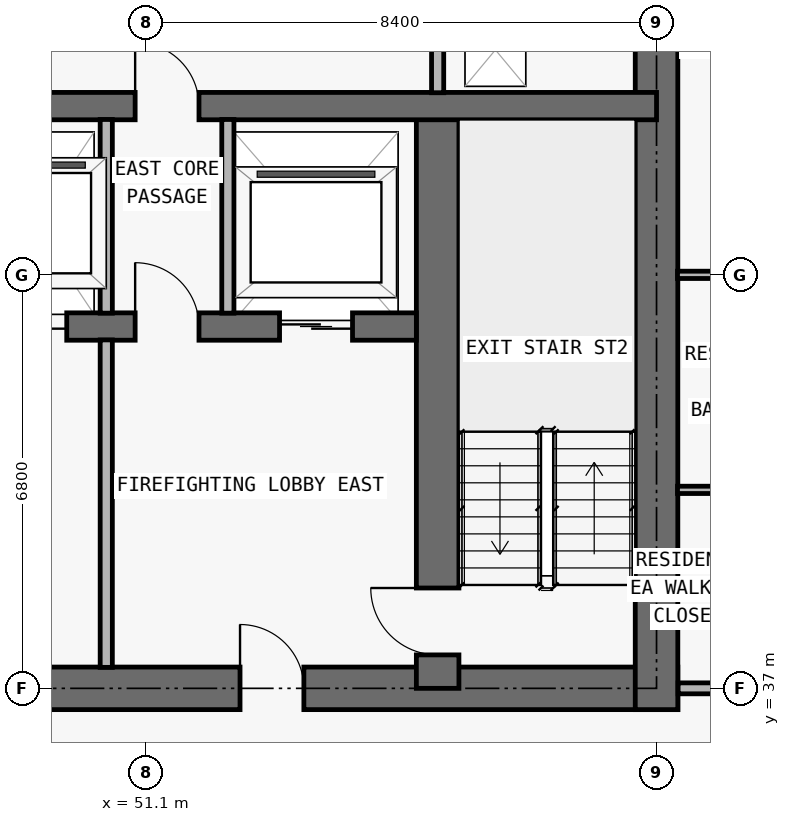
"""IFC4 building model, lengths in metres.
Left out: names, types, materials, properties, quantities, classifications, styles, units other than length and angle.
Written with IfcOpenShell. Run it as: python <this file> out.ifc"""

import sys

from ifc_helpers import new_model, si_unit, direction, frame, frame_2d, origin, place, context, subcontext, project, spatial, rectangle, extrude, element, fill, save


model = new_model("IFC4")
c1 = context("Model", 3, precision=1e-05, world=origin(), true_north=direction((0.0, 1.0)))
c2 = subcontext(c1, "Body", "Model", "MODEL_VIEW")
j1 = project(units=[si_unit("LENGTHUNIT", "METRE"), si_unit("PLANEANGLEUNIT", "RADIAN")], contexts=[c1])
p1 = place(None, origin())
s1 = spatial("IfcSite", under=j1, at=p1, CompositionType="ELEMENT")
p2 = place(p1, origin())
s2 = spatial("IfcBuilding", under=s1, at=p2, CompositionType="ELEMENT")
p3 = place(p2, frame((0.0, 0.0, 249.6)))
s3 = spatial("IfcBuildingStorey", under=s2, at=p3, CompositionType="ELEMENT", Elevation=249.6)
p4 = place(p3, frame((17.95, 37.0, 0.0), z_axis=(0.0, 0.0, 1.0), x_axis=(1.0, 0.0, 0.0)))
e1 = element("IfcWall", 1, at=p4, inside=s3, PredefinedType="SHEAR", context=c2, shape_type="SweptSolid", body=[
    extrude(rectangle(XDim=41.9, YDim=0.7, at=frame_2d((20.95, 0.0))), origin(), (0.0, 0.0, 1.0), 3.05),
])
p5 = place(p4, frame((14.35, 0.0, 0.0)))
e2 = element("IfcOpeningElement", 2, at=p5, cuts=e1, PredefinedType="OPENING", context=c2, shape_type="SweptSolid", body=[
    extrude(rectangle(XDim=1.1, YDim=2.15, at=frame_2d((0.55, 1.075))), frame((0.0, 0.36, 0.0), z_axis=(0.0, -1.0, 0.0), x_axis=(1.0, 0.0, 0.0)), (0.0, 0.0, 1.0), 0.72),
])
p6 = place(p4, frame((6.2, 0.0, 0.0)))
e3 = element("IfcOpeningElement", 3, at=p6, cuts=e1, PredefinedType="OPENING", context=c2, shape_type="SweptSolid", body=[
    extrude(rectangle(XDim=1.05, YDim=2.15, at=frame_2d((0.525, 1.075))), frame((0.0, 0.36, 0.0), z_axis=(0.0, -1.0, 0.0), x_axis=(1.0, 0.0, 0.0)), (0.0, 0.0, 1.0), 0.72),
])
p7 = place(p4, frame((34.7, 0.0, 0.0)))
e4 = element("IfcOpeningElement", 4, at=p7, cuts=e1, PredefinedType="OPENING", context=c2, shape_type="SweptSolid", body=[
    extrude(rectangle(XDim=1.05, YDim=2.15, at=frame_2d((0.525, 1.075))), frame((0.0, 0.36, 0.0), z_axis=(0.0, -1.0, 0.0), x_axis=(1.0, 0.0, 0.0)), (0.0, 0.0, 1.0), 0.72),
])
p8 = place(p4, frame((10.812, 0.0, 0.0)))
e5 = element("IfcOpeningElement", 5, at=p8, cuts=e1, PredefinedType="OPENING", context=c2, shape_type="SweptSolid", body=[
    extrude(rectangle(XDim=1.05, YDim=2.15, at=frame_2d((0.525, 1.075))), frame((0.0, 0.36, 0.0), z_axis=(0.0, -1.0, 0.0), x_axis=(1.0, 0.0, 0.0)), (0.0, 0.0, 1.0), 0.72),
])
p9 = place(p4, frame((24.05, 0.0, 0.0)))
e6 = element("IfcOpeningElement", 6, at=p9, cuts=e1, PredefinedType="OPENING", context=c2, shape_type="SweptSolid", body=[
    extrude(rectangle(XDim=1.05, YDim=2.15, at=frame_2d((0.525, 1.075))), frame((0.0, 0.36, 0.0), z_axis=(0.0, -1.0, 0.0), x_axis=(1.0, 0.0, 0.0)), (0.0, 0.0, 1.0), 0.72),
])
p10 = place(p3, frame((59.5, 36.65, 0.0), z_axis=(0.0, 0.0, 1.0), x_axis=(0.0, 1.0, 0.0)))
e7 = element("IfcWall", 7, at=p10, inside=s3, PredefinedType="SHEAR", context=c2, shape_type="SweptSolid", body=[
    extrude(rectangle(XDim=13.95, YDim=0.7, at=frame_2d((6.975, 0.0))), origin(), (0.0, 0.0, 1.0), 3.05),
])
p11 = place(p3, frame((55.9, 37.0, 0.0), z_axis=(0.0, 0.0, 1.0), x_axis=(0.0, 1.0, 0.0)))
e8 = element("IfcWall", 8, at=p11, inside=s3, PredefinedType="SHEAR", context=c2, shape_type="SweptSolid", body=[
    extrude(rectangle(XDim=9.575, YDim=0.7, at=frame_2d((4.788, 0.0))), origin(), (0.0, 0.0, 1.0), 3.05),
])
p12 = place(p11, frame((0.55, 0.0, 0.0)))
e9 = element("IfcOpeningElement", 9, at=p12, cuts=e8, PredefinedType="OPENING", context=c2, shape_type="SweptSolid", body=[
    extrude(rectangle(XDim=1.1, YDim=2.15, at=frame_2d((0.55, 1.075))), frame((0.0, 0.36, 0.0), z_axis=(0.0, -1.0, 0.0), x_axis=(1.0, 0.0, 0.0)), (0.0, 0.0, 1.0), 0.72),
])
p13 = place(p3, frame((22.25, 42.95, 0.0), z_axis=(0.0, 0.0, 1.0), x_axis=(1.0, 0.0, 0.0)))
e10 = element("IfcWall", 10, at=p13, inside=s3, PredefinedType="SHEAR", context=c2, shape_type="SweptSolid", body=[
    extrude(rectangle(XDim=33.3, YDim=0.45, at=frame_2d((16.65, 0.0))), origin(), (0.0, 0.0, 1.0), 3.05),
])
p14 = place(p13, frame((1.05, 0.0, 0.0)))
e11 = element("IfcOpeningElement", 11, at=p14, cuts=e10, PredefinedType="OPENING", context=c2, shape_type="SweptSolid", body=[
    extrude(rectangle(XDim=1.2, YDim=2.2, at=frame_2d((0.6, 1.1))), frame((0.0, 0.235, 0.0), z_axis=(0.0, -1.0, 0.0), x_axis=(1.0, 0.0, 0.0)), (0.0, 0.0, 1.0), 0.47),
])
p15 = place(p13, frame((31.05, 0.0, 0.0)))
e12 = element("IfcOpeningElement", 12, at=p15, cuts=e10, PredefinedType="OPENING", context=c2, shape_type="SweptSolid", body=[
    extrude(rectangle(XDim=1.2, YDim=2.2, at=frame_2d((0.6, 1.1))), frame((0.0, 0.235, 0.0), z_axis=(0.0, -1.0, 0.0), x_axis=(1.0, 0.0, 0.0)), (0.0, 0.0, 1.0), 0.47),
])
p16 = place(p13, frame((26.45, 0.0, 0.0)))
e13 = element("IfcOpeningElement", 13, at=p16, cuts=e10, PredefinedType="OPENING", context=c2, shape_type="SweptSolid", body=[
    extrude(rectangle(XDim=1.1, YDim=2.2, at=frame_2d((0.55, 1.1))), frame((0.0, 0.235, 0.0), z_axis=(0.0, -1.0, 0.0), x_axis=(1.0, 0.0, 0.0)), (0.0, 0.0, 1.0), 0.47),
])
p17 = place(p13, frame((5.95, 0.0, 0.0)))
e14 = element("IfcOpeningElement", 14, at=p17, cuts=e10, PredefinedType="OPENING", context=c2, shape_type="SweptSolid", body=[
    extrude(rectangle(XDim=1.1, YDim=2.2, at=frame_2d((0.55, 1.1))), frame((0.0, 0.235, 0.0), z_axis=(0.0, -1.0, 0.0), x_axis=(1.0, 0.0, 0.0)), (0.0, 0.0, 1.0), 0.47),
])
p18 = place(p13, frame((3.625, 0.0, 0.0)))
e15 = element("IfcOpeningElement", 15, at=p18, cuts=e10, PredefinedType="OPENING", context=c2, shape_type="SweptSolid", body=[
    extrude(rectangle(XDim=1.05, YDim=2.15, at=frame_2d((0.525, 1.075))), frame((0.0, 0.235, 0.0), z_axis=(0.0, -1.0, 0.0), x_axis=(1.0, 0.0, 0.0)), (0.0, 0.0, 1.0), 0.47),
])
p19 = place(p13, frame((28.675, 0.0, 0.0)))
e16 = element("IfcOpeningElement", 16, at=p19, cuts=e10, PredefinedType="OPENING", context=c2, shape_type="SweptSolid", body=[
    extrude(rectangle(XDim=1.05, YDim=2.15, at=frame_2d((0.525, 1.075))), frame((0.0, 0.235, 0.0), z_axis=(0.0, -1.0, 0.0), x_axis=(1.0, 0.0, 0.0)), (0.0, 0.0, 1.0), 0.47),
])
p20 = place(p13, frame((15.225, 0.0, 0.0)))
e17 = element("IfcOpeningElement", 17, at=p20, cuts=e10, PredefinedType="OPENING", context=c2, shape_type="SweptSolid", body=[
    extrude(rectangle(XDim=1.0, YDim=2.2, at=frame_2d((0.5, 1.1))), frame((0.0, 0.235, 0.0), z_axis=(0.0, -1.0, 0.0), x_axis=(1.0, 0.0, 0.0)), (0.0, 0.0, 1.0), 0.47),
])
p21 = place(p13, frame((21.975, 0.0, 0.0)))
e18 = element("IfcOpeningElement", 18, at=p21, cuts=e10, PredefinedType="OPENING", context=c2, shape_type="SweptSolid", body=[
    extrude(rectangle(XDim=1.0, YDim=2.2, at=frame_2d((0.5, 1.1))), frame((0.0, 0.235, 0.0), z_axis=(0.0, -1.0, 0.0), x_axis=(1.0, 0.0, 0.0)), (0.0, 0.0, 1.0), 0.47),
])
p22 = place(p3, frame((18.3, 46.575, 0.0), z_axis=(0.0, 0.0, 1.0), x_axis=(1.0, 0.0, 0.0)))
e19 = element("IfcWall", 19, at=p22, inside=s3, PredefinedType="SHEAR", context=c2, shape_type="SweptSolid", body=[
    extrude(rectangle(XDim=41.2, YDim=0.45, at=frame_2d((20.6, 0.0))), origin(), (0.0, 0.0, 1.0), 3.05),
])
p23 = place(p22, frame((7.575, 0.0, 0.0)))
e20 = element("IfcOpeningElement", 20, at=p23, cuts=e19, PredefinedType="OPENING", context=c2, shape_type="SweptSolid", body=[
    extrude(rectangle(XDim=1.05, YDim=2.15, at=frame_2d((0.525, 1.075))), frame((0.0, 0.235, 0.0), z_axis=(0.0, -1.0, 0.0), x_axis=(1.0, 0.0, 0.0)), (0.0, 0.0, 1.0), 0.47),
])
p24 = place(p22, frame((32.625, 0.0, 0.0)))
e21 = element("IfcOpeningElement", 21, at=p24, cuts=e19, PredefinedType="OPENING", context=c2, shape_type="SweptSolid", body=[
    extrude(rectangle(XDim=1.05, YDim=2.15, at=frame_2d((0.525, 1.075))), frame((0.0, 0.235, 0.0), z_axis=(0.0, -1.0, 0.0), x_axis=(1.0, 0.0, 0.0)), (0.0, 0.0, 1.0), 0.47),
])
p25 = place(p3, frame((50.45, 37.345, 0.0), z_axis=(0.0, 0.0, 1.0), x_axis=(0.0, 1.0, 0.0)))
e22 = element("IfcWall", 22, at=p25, inside=s3, PredefinedType="PARTITIONING", context=c2, shape_type="SweptSolid", body=[
    extrude(rectangle(XDim=5.385, YDim=0.2, at=frame_2d((2.692, 0.0))), origin(), (0.0, 0.0, 1.0), 3.05),
])
for number, where, z_axis, x_axis in (
    (23, (50.45, 43.17, 0.0), (0.0, 0.0, 1.0), (0.0, 1.0, 0.0)),
    (24, (52.45, 43.17, 0.0), (0.0, 0.0, 1.0), (0.0, 1.0, 0.0)),
):
    element("IfcWall", number, at=place(p3, frame(where, z_axis=z_axis, x_axis=x_axis)), inside=s3, PredefinedType="PARTITIONING", context=c2, shape_type="SweptSolid", body=[
        extrude(rectangle(XDim=3.185, YDim=0.2, at=frame_2d((1.593, 0.0))), origin(), (0.0, 0.0, 1.0), 3.05),
    ])
p26 = place(p3, frame((55.9, 46.795, 0.0), z_axis=(0.0, 0.0, 1.0), x_axis=(0.0, 1.0, 0.0)))
e25 = element("IfcWall", 25, at=p26, inside=s3, PredefinedType="PARTITIONING", context=c2, shape_type="SweptSolid", body=[
    extrude(rectangle(XDim=3.16, YDim=0.2, at=frame_2d((1.58, 0.0))), origin(), (0.0, 0.0, 1.0), 3.05),
])
p27 = place(p3, frame((59.855, 37.0, 0.0), z_axis=(0.0, 0.0, 1.0), x_axis=(1.0, 0.0, 0.0)))
e26 = element("IfcWall", 26, at=p27, inside=s3, PredefinedType="PARTITIONING", context=c2, shape_type="SweptSolid", body=[
    extrude(rectangle(XDim=5.845, YDim=0.18, at=frame_2d((2.922, 0.0))), origin(), (0.0, 0.0, 1.0), 3.05),
])
p28 = place(p27, frame((3.57, 0.0, 0.0)))
e27 = element("IfcOpeningElement", 27, at=p28, cuts=e26, PredefinedType="OPENING", context=c2, shape_type="SweptSolid", body=[
    extrude(rectangle(XDim=1.0, YDim=2.2, at=frame_2d((0.5, 1.1))), frame((0.0, 0.1, 0.0), z_axis=(0.0, -1.0, 0.0), x_axis=(1.0, 0.0, 0.0)), (0.0, 0.0, 1.0), 0.2),
])
p29 = place(p3, frame((59.845, 40.264, 0.0), z_axis=(0.0, 0.0, 1.0), x_axis=(1.0, 0.0, 0.0)))
e28 = element("IfcWall", 28, at=p29, inside=s3, PredefinedType="PARTITIONING", context=c2, shape_type="SweptSolid", body=[
    extrude(rectangle(XDim=2.305, YDim=0.12, at=frame_2d((1.152, 0.0))), origin(), (0.0, 0.0, 1.0), 3.05),
])
p30 = place(p3, frame((59.845, 43.8, 0.0), z_axis=(0.0, 0.0, 1.0), x_axis=(1.0, 0.0, 0.0)))
e29 = element("IfcWall", 29, at=p30, inside=s3, PredefinedType="PARTITIONING", context=c2, shape_type="SweptSolid", body=[
    extrude(rectangle(XDim=9.56, YDim=0.12, at=frame_2d((4.78, 0.0))), origin(), (0.0, 0.0, 1.0), 2.418),
])
p31 = place(p30, frame((3.63, 0.0, 0.0)))
e30 = element("IfcOpeningElement", 30, at=p31, cuts=e29, PredefinedType="OPENING", context=c2, shape_type="SweptSolid", body=[
    extrude(rectangle(XDim=0.9, YDim=2.15, at=frame_2d((0.45, 1.075))), frame((0.0, 0.07, 0.0), z_axis=(0.0, -1.0, 0.0), x_axis=(1.0, 0.0, 0.0)), (0.0, 0.0, 1.0), 0.14),
])
p32 = place(p30, frame((0.728, 0.0, 0.0)))
e31 = element("IfcOpeningElement", 31, at=p32, cuts=e29, PredefinedType="OPENING", context=c2, shape_type="SweptSolid", body=[
    extrude(rectangle(XDim=0.85, YDim=2.1, at=frame_2d((0.425, 1.05))), frame((0.0, 0.07, 0.0), z_axis=(0.0, -1.0, 0.0), x_axis=(1.0, 0.0, 0.0)), (0.0, 0.0, 1.0), 0.14),
])
p33 = place(p15, origin())
e32 = element("IfcDoor", 32, at=p33, inside=s3, OperationType="DOUBLE_DOOR_SLIDING", PredefinedType="DOOR", context=c2, shape_type="SweptSolid", body=[
    extrude(rectangle(XDim=1.2, YDim=2.2, at=frame_2d((0.6, 1.1))), frame((0.0, 0.025, 0.0), z_axis=(0.0, -1.0, 0.0), x_axis=(1.0, 0.0, 0.0)), (0.0, 0.0, 1.0), 0.05),
])
fill(e12, e32)
p34 = place(p16, origin())
e33 = element("IfcDoor", 33, at=p34, inside=s3, OperationType="DOUBLE_DOOR_SLIDING", PredefinedType="DOOR", context=c2, shape_type="SweptSolid", body=[
    extrude(rectangle(XDim=1.1, YDim=2.2, at=frame_2d((0.55, 1.1))), frame((0.0, 0.025, 0.0), z_axis=(0.0, -1.0, 0.0), x_axis=(1.0, 0.0, 0.0)), (0.0, 0.0, 1.0), 0.05),
])
fill(e13, e33)
p35 = place(p7, origin())
e34 = element("IfcDoor", 34, at=p35, inside=s3, OperationType="SINGLE_SWING_LEFT", PredefinedType="DOOR", context=c2, shape_type="SweptSolid", body=[
    extrude(rectangle(XDim=1.05, YDim=2.15, at=frame_2d((0.525, 1.075))), frame((0.0, 0.025, 0.0), z_axis=(0.0, -1.0, 0.0), x_axis=(1.0, 0.0, 0.0)), (0.0, 0.0, 1.0), 0.05),
])
fill(e4, e34)
p36 = place(p12, origin())
e35 = element("IfcDoor", 35, at=p36, inside=s3, OperationType="SINGLE_SWING_RIGHT", PredefinedType="DOOR", context=c2, shape_type="SweptSolid", body=[
    extrude(rectangle(XDim=1.1, YDim=2.15, at=frame_2d((0.55, 1.075))), frame((0.0, 0.025, 0.0), z_axis=(0.0, -1.0, 0.0), x_axis=(1.0, 0.0, 0.0)), (0.0, 0.0, 1.0), 0.05),
])
fill(e9, e35)
p37 = place(p19, origin())
e36 = element("IfcDoor", 36, at=p37, inside=s3, OperationType="SINGLE_SWING_LEFT", PredefinedType="DOOR", context=c2, shape_type="SweptSolid", body=[
    extrude(rectangle(XDim=1.05, YDim=2.15, at=frame_2d((0.525, 1.075))), frame((0.0, 0.025, 0.0), z_axis=(0.0, -1.0, 0.0), x_axis=(1.0, 0.0, 0.0)), (0.0, 0.0, 1.0), 0.05),
])
fill(e16, e36)
p38 = place(p24, origin())
e37 = element("IfcDoor", 37, at=p38, inside=s3, OperationType="SINGLE_SWING_LEFT", PredefinedType="DOOR", context=c2, shape_type="SweptSolid", body=[
    extrude(rectangle(XDim=1.05, YDim=2.15, at=frame_2d((0.525, 1.075))), frame((0.0, 0.025, 0.0), z_axis=(0.0, -1.0, 0.0), x_axis=(1.0, 0.0, 0.0)), (0.0, 0.0, 1.0), 0.05),
])
fill(e21, e37)
save(model, sys.argv[1])
